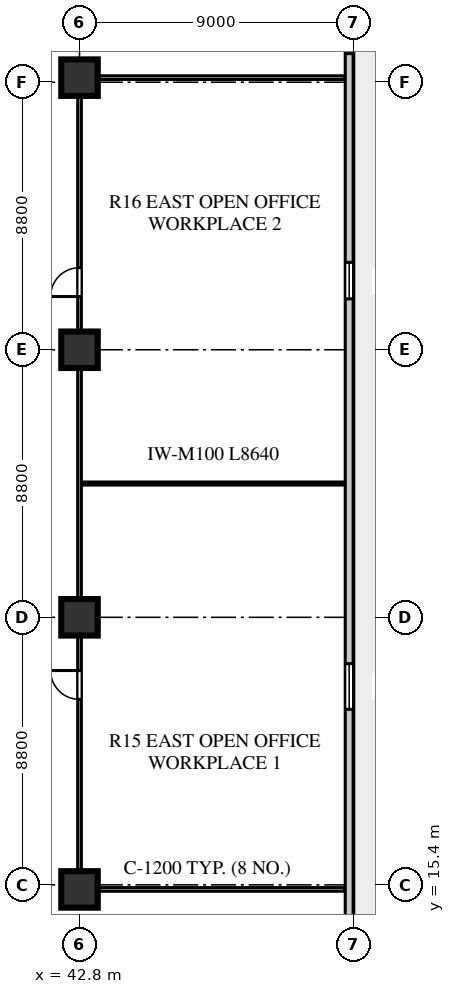
"""IFC4 building model, lengths in metres.
Left out: names, types, materials, properties, quantities, classifications, styles, units other than length and angle.
Written with IfcOpenShell. Run it as: python <this file> out.ifc"""

import sys

from ifc_helpers import new_model, si_unit, direction, frame, frame_2d, origin, origin_2d, place, context, subcontext, project, spatial, rectangle, extrude, element, fill, save


model = new_model("IFC4")
c1 = context("Model", 3, precision=1e-05, world=origin(), true_north=direction((0.0, 1.0)))
c2 = subcontext(c1, "Body", "Model", "MODEL_VIEW")
j1 = project(units=[si_unit("LENGTHUNIT", "METRE"), si_unit("PLANEANGLEUNIT", "RADIAN")], contexts=[c1])
p1 = place(None, origin())
s1 = spatial("IfcSite", under=j1, at=p1, CompositionType="ELEMENT")
p2 = place(p1, origin())
s2 = spatial("IfcBuilding", under=s1, at=p2, CompositionType="ELEMENT")
p3 = place(p2, frame((0.0, 0.0, 34.0)))
s3 = spatial("IfcBuildingStorey", under=s2, at=p3, CompositionType="ELEMENT", Elevation=34.0)
for number, where, z_axis, x_axis in (
    (1, (42.8, 15.25, 0.0), (0.0, 0.0, 1.0), (1.0, 0.0, 0.0)),
    (2, (42.8, 24.2, 0.0), (0.0, 0.0, 1.0), (1.0, 0.0, 0.0)),
    (3, (42.8, 33.0, 0.0), (0.0, 0.0, 1.0), (1.0, 0.0, 0.0)),
    (4, (42.8, 41.95, 0.0), (0.0, 0.0, 1.0), (1.0, 0.0, 0.0)),
):
    element("IfcColumn", number, at=place(p3, frame(where, z_axis=z_axis, x_axis=x_axis)), inside=s3, PredefinedType="COLUMN", context=c2, shape_type="SweptSolid", body=[
        extrude(rectangle(XDim=1.2, YDim=1.2, at=origin_2d()), origin(), (0.0, 0.0, 1.0), 3.72),
    ])
p4 = place(p3, frame((51.67, 12.36, 0.0), z_axis=(0.0, 0.0, 1.0), x_axis=(0.0, 1.0, 0.0)))
e5 = element("IfcWall", 5, at=p4, inside=s3, PredefinedType="SOLIDWALL", context=c2, shape_type="SweptSolid", body=[
    extrude(rectangle(XDim=32.48, YDim=0.26, at=frame_2d((16.24, 0.0))), origin(), (0.0, 0.0, 1.0), 3.72),
])
p5 = place(p4, frame((0.69, 0.0, 0.0)))
e6 = element("IfcOpeningElement", 6, at=p5, cuts=e5, PredefinedType="OPENING", context=c2, shape_type="SweptSolid", body=[
    extrude(rectangle(XDim=1.0, YDim=2.05, at=frame_2d((0.5, 1.025))), frame((0.0, 0.14, 0.0), z_axis=(0.0, -1.0, 0.0), x_axis=(1.0, 0.0, 0.0)), (0.0, 0.0, 1.0), 0.28),
])
p6 = place(p4, frame((8.815, 0.0, 0.8)))
e7 = element("IfcOpeningElement", 7, at=p6, cuts=e5, PredefinedType="OPENING", context=c2, shape_type="SweptSolid", body=[
    extrude(rectangle(XDim=1.5, YDim=2.0, at=frame_2d((0.75, 1.0))), frame((0.0, 0.14, 0.0), z_axis=(0.0, -1.0, 0.0), x_axis=(1.0, 0.0, 0.0)), (0.0, 0.0, 1.0), 0.28),
])
p7 = place(p4, frame((22.315, 0.0, 0.8)))
e8 = element("IfcOpeningElement", 8, at=p7, cuts=e5, PredefinedType="OPENING", context=c2, shape_type="SweptSolid", body=[
    extrude(rectangle(XDim=1.2, YDim=1.75, at=frame_2d((0.6, 0.875))), frame((0.0, 0.14, 0.0), z_axis=(0.0, -1.0, 0.0), x_axis=(1.0, 0.0, 0.0)), (0.0, 0.0, 1.0), 0.28),
])
p8 = place(p4, frame((30.38, 0.0, 0.8)))
e9 = element("IfcOpeningElement", 9, at=p8, cuts=e5, PredefinedType="OPENING", context=c2, shape_type="SweptSolid", body=[
    extrude(rectangle(XDim=1.2, YDim=1.75, at=frame_2d((0.6, 0.875))), frame((0.0, 0.14, 0.0), z_axis=(0.0, -1.0, 0.0), x_axis=(1.0, 0.0, 0.0)), (0.0, 0.0, 1.0), 0.28),
])
p9 = place(p3, frame((42.8, 15.25, 0.0), z_axis=(0.0, 0.0, 1.0), x_axis=(0.0, 1.0, 0.0)))
e10 = element("IfcWall", 10, at=p9, inside=s3, PredefinedType="PARTITIONING", context=c2, shape_type="SweptSolid", body=[
    extrude(rectangle(XDim=26.7, YDim=0.12, at=frame_2d((13.35, 0.0))), origin(), (0.0, 0.0, 1.0), 3.02),
])
p10 = place(p9, frame((6.25, 0.0, 0.0)))
e11 = element("IfcOpeningElement", 11, at=p10, cuts=e10, PredefinedType="OPENING", context=c2, shape_type="SweptSolid", body=[
    extrude(rectangle(XDim=0.95, YDim=2.08, at=frame_2d((0.475, 1.04))), frame((0.0, 0.07, 0.0), z_axis=(0.0, -1.0, 0.0), x_axis=(1.0, 0.0, 0.0)), (0.0, 0.0, 1.0), 0.14),
])
p11 = place(p9, frame((19.5, 0.0, 0.0)))
e12 = element("IfcOpeningElement", 12, at=p11, cuts=e10, PredefinedType="OPENING", context=c2, shape_type="SweptSolid", body=[
    extrude(rectangle(XDim=0.95, YDim=2.08, at=frame_2d((0.475, 1.04))), frame((0.0, 0.07, 0.0), z_axis=(0.0, -1.0, 0.0), x_axis=(1.0, 0.0, 0.0)), (0.0, 0.0, 1.0), 0.14),
])
for number, where, z_axis, x_axis in (
    (13, (42.88, 15.25, 0.0), (0.0, 0.0, 1.0), (1.0, 0.0, 0.0)),
    (14, (42.88, 41.95, 0.0), (0.0, 0.0, 1.0), (1.0, 0.0, 0.0)),
):
    element("IfcWall", number, at=place(p3, frame(where, z_axis=z_axis, x_axis=x_axis)), inside=s3, PredefinedType="PARTITIONING", context=c2, shape_type="SweptSolid", body=[
        extrude(rectangle(XDim=8.64, YDim=0.12, at=frame_2d((4.32, 0.0))), origin(), (0.0, 0.0, 1.0), 3.22),
    ])
p12 = place(p3, frame((42.88, 28.6, 0.0), z_axis=(0.0, 0.0, 1.0), x_axis=(1.0, 0.0, 0.0)))
e15 = element("IfcWall", 15, at=p12, inside=s3, PredefinedType="MOVABLE", context=c2, shape_type="SweptSolid", body=[
    extrude(rectangle(XDim=8.64, YDim=0.1, at=frame_2d((4.32, 0.0))), origin(), (0.0, 0.0, 1.0), 3.72),
])
p13 = place(p6, origin())
e16 = element("IfcWindow", 16, at=p13, inside=s3, PartitioningType="SINGLE_PANEL", PredefinedType="WINDOW", context=c2, shape_type="SweptSolid", body=[
    extrude(rectangle(XDim=1.5, YDim=2.0, at=frame_2d((0.75, 1.0))), frame((0.0, 0.03, 0.0), z_axis=(0.0, -1.0, 0.0), x_axis=(1.0, 0.0, 0.0)), (0.0, 0.0, 1.0), 0.06),
])
fill(e7, e16)
p14 = place(p7, origin())
e17 = element("IfcWindow", 17, at=p14, inside=s3, PartitioningType="SINGLE_PANEL", PredefinedType="WINDOW", context=c2, shape_type="SweptSolid", body=[
    extrude(rectangle(XDim=1.2, YDim=1.75, at=frame_2d((0.6, 0.875))), frame((0.0, 0.03, 0.0), z_axis=(0.0, -1.0, 0.0), x_axis=(1.0, 0.0, 0.0)), (0.0, 0.0, 1.0), 0.06),
])
fill(e8, e17)
p15 = place(p8, origin())
e18 = element("IfcWindow", 18, at=p15, inside=s3, PartitioningType="SINGLE_PANEL", PredefinedType="WINDOW", context=c2, shape_type="SweptSolid", body=[
    extrude(rectangle(XDim=1.2, YDim=1.75, at=frame_2d((0.6, 0.875))), frame((0.0, 0.03, 0.0), z_axis=(0.0, -1.0, 0.0), x_axis=(1.0, 0.0, 0.0)), (0.0, 0.0, 1.0), 0.06),
])
fill(e9, e18)
p16 = place(p10, origin())
e19 = element("IfcDoor", 19, at=p16, inside=s3, OperationType="SINGLE_SWING_RIGHT", PredefinedType="DOOR", context=c2, shape_type="SweptSolid", body=[
    extrude(rectangle(XDim=0.95, YDim=2.08, at=frame_2d((0.475, 1.04))), frame((0.0, 0.025, 0.0), z_axis=(0.0, -1.0, 0.0), x_axis=(1.0, 0.0, 0.0)), (0.0, 0.0, 1.0), 0.05),
])
fill(e11, e19)
p17 = place(p11, origin())
e20 = element("IfcDoor", 20, at=p17, inside=s3, OperationType="SINGLE_SWING_LEFT", PredefinedType="DOOR", context=c2, shape_type="SweptSolid", body=[
    extrude(rectangle(XDim=0.95, YDim=2.08, at=frame_2d((0.475, 1.04))), frame((0.0, 0.025, 0.0), z_axis=(0.0, -1.0, 0.0), x_axis=(1.0, 0.0, 0.0)), (0.0, 0.0, 1.0), 0.05),
])
fill(e12, e20)
save(model, sys.argv[1])
